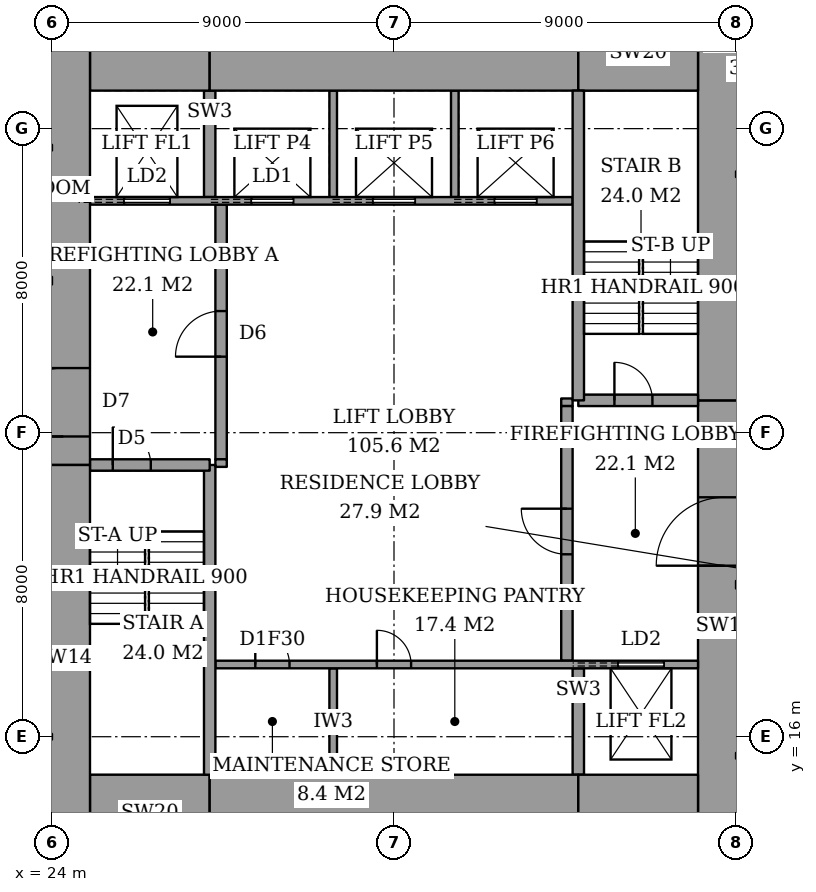
"""IFC4 building model, lengths in metres.
Left out: names, types, materials, properties, quantities, classifications, styles, units other than length and angle.
Written with IfcOpenShell. Run it as: python <this file> out.ifc"""

import sys

from ifc_helpers import new_model, si_unit, direction, frame, frame_2d, origin, place, context, subcontext, project, spatial, rectangle, extrude, element, fill, save


model = new_model("IFC4")
c1 = context("Model", 3, precision=1e-05, world=origin(), true_north=direction((0.0, 1.0)))
c2 = subcontext(c1, "Body", "Model", "MODEL_VIEW")
j1 = project(units=[si_unit("LENGTHUNIT", "METRE"), si_unit("PLANEANGLEUNIT", "RADIAN")], contexts=[c1])
p1 = place(None, origin())
s1 = spatial("IfcSite", under=j1, at=p1, CompositionType="ELEMENT")
p2 = place(p1, origin())
s2 = spatial("IfcBuilding", under=s1, at=p2, CompositionType="ELEMENT")
p3 = place(p2, frame((0.0, 0.0, 207.4)))
s3 = spatial("IfcBuildingStorey", under=s2, at=p3, CompositionType="ELEMENT", Elevation=207.4)
p4 = place(p3, frame((25.0, 14.0, 0.0), z_axis=(0.0, 0.0, 1.0), x_axis=(1.0, 0.0, 0.0)))
e1 = element("IfcWall", 1, at=p4, inside=s3, PredefinedType="SHEAR", context=c2, shape_type="SweptSolid", body=[
    extrude(rectangle(XDim=3.15, YDim=2.0, at=frame_2d((1.575, 0.0))), origin(), (0.0, 0.0, 1.0), 3.6),
])
p5 = place(p3, frame((28.15, 14.0, 0.0), z_axis=(0.0, 0.0, 1.0), x_axis=(1.0, 0.0, 0.0)))
e2 = element("IfcWall", 2, at=p5, inside=s3, PredefinedType="SHEAR", context=c2, shape_type="SweptSolid", body=[
    extrude(rectangle(XDim=9.7, YDim=2.0, at=frame_2d((4.85, 0.0))), origin(), (0.0, 0.0, 1.0), 3.6),
])
for number, where, z_axis, x_axis in (
    (3, (37.85, 14.0, 0.0), (0.0, 0.0, 1.0), (1.0, 0.0, 0.0)),
    (4, (25.0, 34.0, 0.0), (0.0, 0.0, 1.0), (1.0, 0.0, 0.0)),
):
    element("IfcWall", number, at=place(p3, frame(where, z_axis=z_axis, x_axis=x_axis)), inside=s3, PredefinedType="SHEAR", context=c2, shape_type="SweptSolid", body=[
        extrude(rectangle(XDim=3.15, YDim=2.0, at=frame_2d((1.575, 0.0))), origin(), (0.0, 0.0, 1.0), 3.6),
    ])
p6 = place(p3, frame((28.15, 34.0, 0.0), z_axis=(0.0, 0.0, 1.0), x_axis=(1.0, 0.0, 0.0)))
e5 = element("IfcWall", 5, at=p6, inside=s3, PredefinedType="SHEAR", context=c2, shape_type="SweptSolid", body=[
    extrude(rectangle(XDim=9.7, YDim=2.0, at=frame_2d((4.85, 0.0))), origin(), (0.0, 0.0, 1.0), 3.6),
])
p7 = place(p3, frame((37.85, 34.0, 0.0), z_axis=(0.0, 0.0, 1.0), x_axis=(1.0, 0.0, 0.0)))
e6 = element("IfcWall", 6, at=p7, inside=s3, PredefinedType="SHEAR", context=c2, shape_type="SweptSolid", body=[
    extrude(rectangle(XDim=3.15, YDim=2.0, at=frame_2d((1.575, 0.0))), origin(), (0.0, 0.0, 1.0), 3.6),
])
p8 = place(p3, frame((24.3, 13.0, 0.0), z_axis=(0.0, 0.0, 1.0), x_axis=(0.0, 1.0, 0.0)))
e7 = element("IfcWall", 7, at=p8, inside=s3, PredefinedType="SHEAR", context=c2, shape_type="SweptSolid", body=[
    extrude(rectangle(XDim=10.15, YDim=1.4, at=frame_2d((5.075, 0.0))), origin(), (0.0, 0.0, 1.0), 3.6),
])
p9 = place(p3, frame((24.3, 23.15, 0.0), z_axis=(0.0, 0.0, 1.0), x_axis=(0.0, 1.0, 0.0)))
e8 = element("IfcWall", 8, at=p9, inside=s3, PredefinedType="SHEAR", context=c2, shape_type="SweptSolid", body=[
    extrude(rectangle(XDim=11.85, YDim=1.4, at=frame_2d((5.925, 0.0))), origin(), (0.0, 0.0, 1.0), 3.6),
])
p10 = place(p9, frame((0.75, 0.0, 0.0)))
e9 = element("IfcOpeningElement", 9, at=p10, cuts=e8, PredefinedType="OPENING", context=c2, shape_type="SweptSolid", body=[
    extrude(rectangle(XDim=1.8, YDim=2.4, at=frame_2d((0.9, 1.2))), frame((0.0, 0.71, 0.0), z_axis=(0.0, -1.0, 0.0), x_axis=(1.0, 0.0, 0.0)), (0.0, 0.0, 1.0), 1.42),
])
p11 = place(p3, frame((41.7, 13.0, 0.0), z_axis=(0.0, 0.0, 1.0), x_axis=(0.0, 1.0, 0.0)))
e10 = element("IfcWall", 10, at=p11, inside=s3, PredefinedType="SHEAR", context=c2, shape_type="SweptSolid", body=[
    extrude(rectangle(XDim=11.85, YDim=1.4, at=frame_2d((5.925, 0.0))), origin(), (0.0, 0.0, 1.0), 3.6),
])
p12 = place(p11, frame((7.5, 0.0, 0.0)))
e11 = element("IfcOpeningElement", 11, at=p12, cuts=e10, PredefinedType="OPENING", context=c2, shape_type="SweptSolid", body=[
    extrude(rectangle(XDim=1.8, YDim=2.4, at=frame_2d((0.9, 1.2))), frame((0.0, 0.71, 0.0), z_axis=(0.0, -1.0, 0.0), x_axis=(1.0, 0.0, 0.0)), (0.0, 0.0, 1.0), 1.42),
])
p13 = place(p3, frame((41.7, 24.85, 0.0), z_axis=(0.0, 0.0, 1.0), x_axis=(0.0, 1.0, 0.0)))
e12 = element("IfcWall", 12, at=p13, inside=s3, PredefinedType="SHEAR", context=c2, shape_type="SweptSolid", body=[
    extrude(rectangle(XDim=10.15, YDim=1.4, at=frame_2d((5.075, 0.0))), origin(), (0.0, 0.0, 1.0), 3.6),
])
p14 = place(p3, frame((28.15, 15.0, 0.0), z_axis=(0.0, 0.0, 1.0), x_axis=(0.0, 1.0, 0.0)))
e13 = element("IfcWall", 13, at=p14, inside=s3, PredefinedType="SHEAR", context=c2, shape_type="SweptSolid", body=[
    extrude(rectangle(XDim=8.15, YDim=0.3, at=frame_2d((4.075, 0.0))), origin(), (0.0, 0.0, 1.0), 3.6),
])
p15 = place(p3, frame((25.0, 23.15, 0.0), z_axis=(0.0, 0.0, 1.0), x_axis=(1.0, 0.0, 0.0)))
e14 = element("IfcWall", 14, at=p15, inside=s3, PredefinedType="SHEAR", context=c2, shape_type="SweptSolid", body=[
    extrude(rectangle(XDim=3.15, YDim=0.3, at=frame_2d((1.575, 0.0))), origin(), (0.0, 0.0, 1.0), 3.6),
])
p16 = place(p15, frame((0.6, 0.0, 0.0)))
e15 = element("IfcOpeningElement", 15, at=p16, cuts=e14, PredefinedType="OPENING", context=c2, shape_type="SweptSolid", body=[
    extrude(rectangle(XDim=1.0, YDim=2.1, at=frame_2d((0.5, 1.05))), frame((0.0, 0.16, 0.0), z_axis=(0.0, -1.0, 0.0), x_axis=(1.0, 0.0, 0.0)), (0.0, 0.0, 1.0), 0.32),
])
p17 = place(p3, frame((37.85, 24.85, 0.0), z_axis=(0.0, 0.0, 1.0), x_axis=(0.0, 1.0, 0.0)))
e16 = element("IfcWall", 16, at=p17, inside=s3, PredefinedType="SHEAR", context=c2, shape_type="SweptSolid", body=[
    extrude(rectangle(XDim=8.15, YDim=0.3, at=frame_2d((4.075, 0.0))), origin(), (0.0, 0.0, 1.0), 3.6),
])
p18 = place(p3, frame((37.85, 24.85, 0.0), z_axis=(0.0, 0.0, 1.0), x_axis=(1.0, 0.0, 0.0)))
e17 = element("IfcWall", 17, at=p18, inside=s3, PredefinedType="SHEAR", context=c2, shape_type="SweptSolid", body=[
    extrude(rectangle(XDim=3.15, YDim=0.3, at=frame_2d((1.575, 0.0))), origin(), (0.0, 0.0, 1.0), 3.6),
])
p19 = place(p18, frame((0.95, 0.0, 0.0)))
e18 = element("IfcOpeningElement", 18, at=p19, cuts=e17, PredefinedType="OPENING", context=c2, shape_type="SweptSolid", body=[
    extrude(rectangle(XDim=1.0, YDim=2.1, at=frame_2d((0.5, 1.05))), frame((0.0, 0.16, 0.0), z_axis=(0.0, -1.0, 0.0), x_axis=(1.0, 0.0, 0.0)), (0.0, 0.0, 1.0), 0.32),
])
p20 = place(p3, frame((28.45, 23.3, 0.0), z_axis=(0.0, 0.0, 1.0), x_axis=(0.0, 1.0, 0.0)))
e19 = element("IfcWall", 19, at=p20, inside=s3, PredefinedType="PARTITIONING", context=c2, shape_type="SweptSolid", body=[
    extrude(rectangle(XDim=6.7, YDim=0.3, at=frame_2d((3.35, 0.0))), origin(), (0.0, 0.0, 1.0), 3.6),
])
p21 = place(p20, frame((2.7, 0.0, 0.0)))
e20 = element("IfcOpeningElement", 20, at=p21, cuts=e19, PredefinedType="OPENING", context=c2, shape_type="SweptSolid", body=[
    extrude(rectangle(XDim=1.2, YDim=2.1, at=frame_2d((0.6, 1.05))), frame((0.0, 0.16, 0.0), z_axis=(0.0, -1.0, 0.0), x_axis=(1.0, 0.0, 0.0)), (0.0, 0.0, 1.0), 0.32),
])
p22 = place(p3, frame((37.55, 18.0, 0.0), z_axis=(0.0, 0.0, 1.0), x_axis=(0.0, 1.0, 0.0)))
e21 = element("IfcWall", 21, at=p22, inside=s3, PredefinedType="PARTITIONING", context=c2, shape_type="SweptSolid", body=[
    extrude(rectangle(XDim=6.7, YDim=0.3, at=frame_2d((3.35, 0.0))), origin(), (0.0, 0.0, 1.0), 3.6),
])
p23 = place(p22, frame((2.8, 0.0, 0.0)))
e22 = element("IfcOpeningElement", 22, at=p23, cuts=e21, PredefinedType="OPENING", context=c2, shape_type="SweptSolid", body=[
    extrude(rectangle(XDim=1.2, YDim=2.1, at=frame_2d((0.6, 1.05))), frame((0.0, 0.16, 0.0), z_axis=(0.0, -1.0, 0.0), x_axis=(1.0, 0.0, 0.0)), (0.0, 0.0, 1.0), 0.32),
])
p24 = place(p3, frame((28.3, 17.9, 0.0), z_axis=(0.0, 0.0, 1.0), x_axis=(1.0, 0.0, 0.0)))
e23 = element("IfcWall", 23, at=p24, inside=s3, PredefinedType="PARTITIONING", context=c2, shape_type="SweptSolid", body=[
    extrude(rectangle(XDim=12.7, YDim=0.2, at=frame_2d((6.35, 0.0))), origin(), (0.0, 0.0, 1.0), 3.6),
])
p25 = place(p24, frame((1.05, 0.0, 0.0)))
e24 = element("IfcOpeningElement", 24, at=p25, cuts=e23, PredefinedType="OPENING", context=c2, shape_type="SweptSolid", body=[
    extrude(rectangle(XDim=0.9, YDim=2.1, at=frame_2d((0.45, 1.05))), frame((0.0, 0.11, 0.0), z_axis=(0.0, -1.0, 0.0), x_axis=(1.0, 0.0, 0.0)), (0.0, 0.0, 1.0), 0.22),
])
p26 = place(p24, frame((4.25, 0.0, 0.0)))
e25 = element("IfcOpeningElement", 25, at=p26, cuts=e23, PredefinedType="OPENING", context=c2, shape_type="SweptSolid", body=[
    extrude(rectangle(XDim=0.9, YDim=2.1, at=frame_2d((0.45, 1.05))), frame((0.0, 0.11, 0.0), z_axis=(0.0, -1.0, 0.0), x_axis=(1.0, 0.0, 0.0)), (0.0, 0.0, 1.0), 0.22),
])
p27 = place(p24, frame((10.6, 0.0, 0.0)))
e26 = element("IfcOpeningElement", 26, at=p27, cuts=e23, PredefinedType="OPENING", context=c2, shape_type="SweptSolid", body=[
    extrude(rectangle(XDim=1.2, YDim=2.1, at=frame_2d((0.6, 1.05))), frame((0.0, 0.11, 0.0), z_axis=(0.0, -1.0, 0.0), x_axis=(1.0, 0.0, 0.0)), (0.0, 0.0, 1.0), 0.22),
])
p28 = place(p3, frame((25.0, 30.1, 0.0), z_axis=(0.0, 0.0, 1.0), x_axis=(1.0, 0.0, 0.0)))
e27 = element("IfcWall", 27, at=p28, inside=s3, PredefinedType="PARTITIONING", context=c2, shape_type="SweptSolid", body=[
    extrude(rectangle(XDim=12.7, YDim=0.2, at=frame_2d((6.35, 0.0))), origin(), (0.0, 0.0, 1.0), 3.6),
])
p29 = place(p28, frame((4.25, 0.0, 0.0)))
e28 = element("IfcOpeningElement", 28, at=p29, cuts=e27, PredefinedType="OPENING", context=c2, shape_type="SweptSolid", body=[
    extrude(rectangle(XDim=1.1, YDim=2.1, at=frame_2d((0.55, 1.05))), frame((0.0, 0.11, 0.0), z_axis=(0.0, -1.0, 0.0), x_axis=(1.0, 0.0, 0.0)), (0.0, 0.0, 1.0), 0.22),
])
p30 = place(p28, frame((7.45, 0.0, 0.0)))
e29 = element("IfcOpeningElement", 29, at=p30, cuts=e27, PredefinedType="OPENING", context=c2, shape_type="SweptSolid", body=[
    extrude(rectangle(XDim=1.1, YDim=2.1, at=frame_2d((0.55, 1.05))), frame((0.0, 0.11, 0.0), z_axis=(0.0, -1.0, 0.0), x_axis=(1.0, 0.0, 0.0)), (0.0, 0.0, 1.0), 0.22),
])
p31 = place(p28, frame((10.65, 0.0, 0.0)))
e30 = element("IfcOpeningElement", 30, at=p31, cuts=e27, PredefinedType="OPENING", context=c2, shape_type="SweptSolid", body=[
    extrude(rectangle(XDim=1.1, YDim=2.1, at=frame_2d((0.55, 1.05))), frame((0.0, 0.11, 0.0), z_axis=(0.0, -1.0, 0.0), x_axis=(1.0, 0.0, 0.0)), (0.0, 0.0, 1.0), 0.22),
])
p32 = place(p28, frame((0.9, 0.0, 0.0)))
e31 = element("IfcOpeningElement", 31, at=p32, cuts=e27, PredefinedType="OPENING", context=c2, shape_type="SweptSolid", body=[
    extrude(rectangle(XDim=1.2, YDim=2.1, at=frame_2d((0.6, 1.05))), frame((0.0, 0.11, 0.0), z_axis=(0.0, -1.0, 0.0), x_axis=(1.0, 0.0, 0.0)), (0.0, 0.0, 1.0), 0.22),
])
p33 = place(p3, frame((31.4, 15.0, 0.0), z_axis=(0.0, 0.0, 1.0), x_axis=(0.0, 1.0, 0.0)))
e32 = element("IfcWall", 32, at=p33, inside=s3, PredefinedType="PARTITIONING", context=c2, shape_type="SweptSolid", body=[
    extrude(rectangle(XDim=2.8, YDim=0.2, at=frame_2d((1.4, 0.0))), origin(), (0.0, 0.0, 1.0), 3.6),
])
p34 = place(p3, frame((37.85, 15.0, 0.0), z_axis=(0.0, 0.0, 1.0), x_axis=(0.0, 1.0, 0.0)))
e33 = element("IfcWall", 33, at=p34, inside=s3, PredefinedType="SHEAR", context=c2, shape_type="SweptSolid", body=[
    extrude(rectangle(XDim=2.8, YDim=0.3, at=frame_2d((1.4, 0.0))), origin(), (0.0, 0.0, 1.0), 3.6),
])
for number, where, z_axis, x_axis in (
    (34, (31.4, 30.2, 0.0), (0.0, 0.0, 1.0), (0.0, 1.0, 0.0)),
    (35, (34.6, 30.2, 0.0), (0.0, 0.0, 1.0), (0.0, 1.0, 0.0)),
):
    element("IfcWall", number, at=place(p3, frame(where, z_axis=z_axis, x_axis=x_axis)), inside=s3, PredefinedType="PARTITIONING", context=c2, shape_type="SweptSolid", body=[
        extrude(rectangle(XDim=2.8, YDim=0.2, at=frame_2d((1.4, 0.0))), origin(), (0.0, 0.0, 1.0), 3.6),
    ])
p35 = place(p3, frame((28.15, 30.2, 0.0), z_axis=(0.0, 0.0, 1.0), x_axis=(0.0, 1.0, 0.0)))
e36 = element("IfcWall", 36, at=p35, inside=s3, PredefinedType="SHEAR", context=c2, shape_type="SweptSolid", body=[
    extrude(rectangle(XDim=2.8, YDim=0.3, at=frame_2d((1.4, 0.0))), origin(), (0.0, 0.0, 1.0), 3.6),
])
for number, where, z_axis, x_axis in (
    (37, (28.3, 23.2, 0.0), (0.0, 0.0, 1.0), (1.0, 0.0, 0.0)),
    (38, (37.4, 24.8, 0.0), (0.0, 0.0, 1.0), (1.0, 0.0, 0.0)),
):
    element("IfcWall", number, at=place(p3, frame(where, z_axis=z_axis, x_axis=x_axis)), inside=s3, PredefinedType="PARTITIONING", context=c2, shape_type="SweptSolid", body=[
        extrude(rectangle(XDim=0.3, YDim=0.2, at=frame_2d((0.15, 0.0))), origin(), (0.0, 0.0, 1.0), 3.6),
    ])
p36 = place(p16, origin())
e39 = element("IfcDoor", 39, at=p36, inside=s3, OperationType="SINGLE_SWING_RIGHT", PredefinedType="DOOR", context=c2, shape_type="SweptSolid", body=[
    extrude(rectangle(XDim=1.0, YDim=2.1, at=frame_2d((0.5, 1.05))), frame((0.0, 0.025, 0.0), z_axis=(0.0, -1.0, 0.0), x_axis=(1.0, 0.0, 0.0)), (0.0, 0.0, 1.0), 0.05),
])
fill(e15, e39)
p37 = place(p19, origin())
e40 = element("IfcDoor", 40, at=p37, inside=s3, OperationType="SINGLE_SWING_RIGHT", PredefinedType="DOOR", context=c2, shape_type="SweptSolid", body=[
    extrude(rectangle(XDim=1.0, YDim=2.1, at=frame_2d((0.5, 1.05))), frame((0.0, 0.025, 0.0), z_axis=(0.0, -1.0, 0.0), x_axis=(1.0, 0.0, 0.0)), (0.0, 0.0, 1.0), 0.05),
])
fill(e18, e40)
p38 = place(p21, origin())
e41 = element("IfcDoor", 41, at=p38, inside=s3, OperationType="SINGLE_SWING_RIGHT", PredefinedType="DOOR", context=c2, shape_type="SweptSolid", body=[
    extrude(rectangle(XDim=1.2, YDim=2.1, at=frame_2d((0.6, 1.05))), frame((0.0, 0.025, 0.0), z_axis=(0.0, -1.0, 0.0), x_axis=(1.0, 0.0, 0.0)), (0.0, 0.0, 1.0), 0.05),
])
fill(e20, e41)
p39 = place(p23, origin())
e42 = element("IfcDoor", 42, at=p39, inside=s3, OperationType="SINGLE_SWING_LEFT", PredefinedType="DOOR", context=c2, shape_type="SweptSolid", body=[
    extrude(rectangle(XDim=1.2, YDim=2.1, at=frame_2d((0.6, 1.05))), frame((0.0, 0.025, 0.0), z_axis=(0.0, -1.0, 0.0), x_axis=(1.0, 0.0, 0.0)), (0.0, 0.0, 1.0), 0.05),
])
fill(e22, e42)
p40 = place(p10, origin())
e43 = element("IfcDoor", 43, at=p40, inside=s3, OperationType="DOUBLE_DOOR_DOUBLE_SWING", PredefinedType="DOOR", context=c2, shape_type="SweptSolid", body=[
    extrude(rectangle(XDim=1.8, YDim=2.4, at=frame_2d((0.9, 1.2))), frame((0.0, 0.025, 0.0), z_axis=(0.0, -1.0, 0.0), x_axis=(1.0, 0.0, 0.0)), (0.0, 0.0, 1.0), 0.05),
])
fill(e9, e43)
p41 = place(p12, origin())
e44 = element("IfcDoor", 44, at=p41, inside=s3, OperationType="DOUBLE_DOOR_DOUBLE_SWING", PredefinedType="DOOR", context=c2, shape_type="SweptSolid", body=[
    extrude(rectangle(XDim=1.8, YDim=2.4, at=frame_2d((0.9, 1.2))), frame((0.0, 0.025, 0.0), z_axis=(0.0, -1.0, 0.0), x_axis=(1.0, 0.0, 0.0)), (0.0, 0.0, 1.0), 0.05),
])
fill(e11, e44)
p42 = place(p25, origin())
e45 = element("IfcDoor", 45, at=p42, inside=s3, OperationType="SINGLE_SWING_RIGHT", PredefinedType="DOOR", context=c2, shape_type="SweptSolid", body=[
    extrude(rectangle(XDim=0.9, YDim=2.1, at=frame_2d((0.45, 1.05))), frame((0.0, 0.025, 0.0), z_axis=(0.0, -1.0, 0.0), x_axis=(1.0, 0.0, 0.0)), (0.0, 0.0, 1.0), 0.05),
])
fill(e24, e45)
p43 = place(p26, origin())
e46 = element("IfcDoor", 46, at=p43, inside=s3, OperationType="SINGLE_SWING_RIGHT", PredefinedType="DOOR", context=c2, shape_type="SweptSolid", body=[
    extrude(rectangle(XDim=0.9, YDim=2.1, at=frame_2d((0.45, 1.05))), frame((0.0, 0.025, 0.0), z_axis=(0.0, -1.0, 0.0), x_axis=(1.0, 0.0, 0.0)), (0.0, 0.0, 1.0), 0.05),
])
fill(e25, e46)
p44 = place(p29, origin())
e47 = element("IfcDoor", 47, at=p44, inside=s3, OperationType="SLIDING_TO_LEFT", PredefinedType="DOOR", context=c2, shape_type="SweptSolid", body=[
    extrude(rectangle(XDim=1.1, YDim=2.1, at=frame_2d((0.55, 1.05))), frame((0.0, 0.025, 0.0), z_axis=(0.0, -1.0, 0.0), x_axis=(1.0, 0.0, 0.0)), (0.0, 0.0, 1.0), 0.05),
])
fill(e28, e47)
p45 = place(p30, origin())
e48 = element("IfcDoor", 48, at=p45, inside=s3, OperationType="SLIDING_TO_LEFT", PredefinedType="DOOR", context=c2, shape_type="SweptSolid", body=[
    extrude(rectangle(XDim=1.1, YDim=2.1, at=frame_2d((0.55, 1.05))), frame((0.0, 0.025, 0.0), z_axis=(0.0, -1.0, 0.0), x_axis=(1.0, 0.0, 0.0)), (0.0, 0.0, 1.0), 0.05),
])
fill(e29, e48)
p46 = place(p31, origin())
e49 = element("IfcDoor", 49, at=p46, inside=s3, OperationType="SLIDING_TO_LEFT", PredefinedType="DOOR", context=c2, shape_type="SweptSolid", body=[
    extrude(rectangle(XDim=1.1, YDim=2.1, at=frame_2d((0.55, 1.05))), frame((0.0, 0.025, 0.0), z_axis=(0.0, -1.0, 0.0), x_axis=(1.0, 0.0, 0.0)), (0.0, 0.0, 1.0), 0.05),
])
fill(e30, e49)
p47 = place(p32, origin())
e50 = element("IfcDoor", 50, at=p47, inside=s3, OperationType="SLIDING_TO_LEFT", PredefinedType="DOOR", context=c2, shape_type="SweptSolid", body=[
    extrude(rectangle(XDim=1.2, YDim=2.1, at=frame_2d((0.6, 1.05))), frame((0.0, 0.025, 0.0), z_axis=(0.0, -1.0, 0.0), x_axis=(1.0, 0.0, 0.0)), (0.0, 0.0, 1.0), 0.05),
])
fill(e31, e50)
p48 = place(p27, origin())
e51 = element("IfcDoor", 51, at=p48, inside=s3, OperationType="SLIDING_TO_LEFT", PredefinedType="DOOR", context=c2, shape_type="SweptSolid", body=[
    extrude(rectangle(XDim=1.2, YDim=2.1, at=frame_2d((0.6, 1.05))), frame((0.0, 0.025, 0.0), z_axis=(0.0, -1.0, 0.0), x_axis=(1.0, 0.0, 0.0)), (0.0, 0.0, 1.0), 0.05),
])
fill(e26, e51)
save(model, sys.argv[1])
